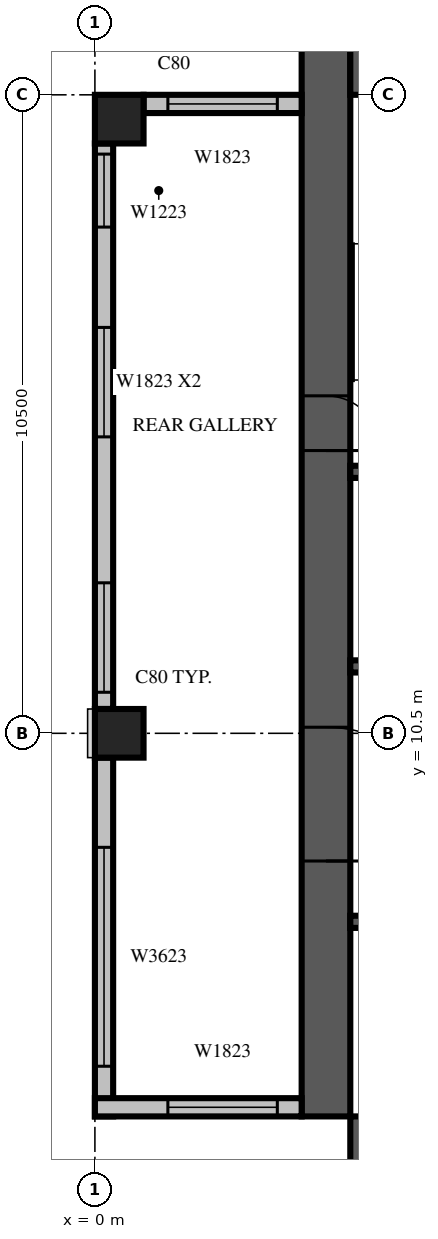
"""IFC4 building model, lengths in metres.
Left out: names, types, materials, properties, quantities, classifications, styles, units other than length and angle.
Written with IfcOpenShell. Run it as: python <this file> out.ifc"""

import sys

from ifc_helpers import new_model, si_unit, direction, frame, frame_2d, origin, origin_2d, place, context, subcontext, project, spatial, rectangle, extrude, source, transform, mapped, element, fill, save


model = new_model("IFC4")
c1 = context("Model", 3, precision=1e-05, world=origin(), true_north=direction((0.0, 1.0)))
c2 = subcontext(c1, "Body", "Model", "MODEL_VIEW")
j1 = project(units=[si_unit("LENGTHUNIT", "METRE"), si_unit("PLANEANGLEUNIT", "RADIAN")], contexts=[c1])
p1 = place(None, origin())
s1 = spatial("IfcSite", under=j1, at=p1, CompositionType="ELEMENT")
p2 = place(p1, origin())
s2 = spatial("IfcBuilding", under=s1, at=p2, CompositionType="ELEMENT")
p3 = place(p2, frame((0.0, 0.0, 227.2)))
s3 = spatial("IfcBuildingStorey", under=s2, at=p3, CompositionType="ELEMENT", Elevation=227.2)
m1 = source(origin(), c2, "Body", "SweptSolid", [
    extrude(rectangle(XDim=0.8, YDim=0.8, at=origin_2d()), origin(), (0.0, 0.0, 1.0), 3.8),
])
for number, where, z_axis, x_axis in (
    (1, (0.4, 10.5, 0.0), (0.0, 0.0, 1.0), (1.0, 0.0, 0.0)),
    (2, (0.4, 20.6, 0.0), (0.0, 0.0, 1.0), (1.0, 0.0, 0.0)),
):
    element("IfcColumn", number, at=place(p3, frame(where, z_axis=z_axis, x_axis=x_axis)), inside=s3, PredefinedType="COLUMN", context=c2, shape_type="MappedRepresentation", body=[
        mapped(m1, transform((0.0, 0.0, 0.0), scale=1.0)),
    ])
m2 = source(origin(), c2, "Body", "SweptSolid", [
    extrude(rectangle(XDim=17.6, YDim=0.8, at=frame_2d((8.8, 0.0))), origin(), (0.0, 0.0, 1.0), 3.8),
])
p4 = place(p3, frame((3.8, 4.2, 0.0), z_axis=(0.0, 0.0, 1.0), x_axis=(0.0, 1.0, 0.0)))
e3 = element("IfcWall", 3, at=p4, inside=s3, PredefinedType="SHEAR", context=c2, shape_type="MappedRepresentation", body=[
    mapped(m2, transform((0.0, 0.0, 0.0), scale=1.0)),
])
m3 = source(origin(), c2, "Body", "SweptSolid", [
    extrude(rectangle(XDim=2.2, YDim=2.1, at=frame_2d((1.1, 1.05))), frame((0.0, 0.41, 0.0), z_axis=(0.0, -1.0, 0.0), x_axis=(1.0, 0.0, 0.0)), (0.0, 0.0, 1.0), 0.82),
])
p5 = place(p4, frame((4.2, 0.0, 0.0)))
e4 = element("IfcOpeningElement", 4, at=p5, cuts=e3, PredefinedType="OPENING", context=c2, shape_type="MappedRepresentation", body=[
    mapped(m3, transform((0.0, 0.0, 0.0), scale=1.0)),
])
m4 = source(origin(), c2, "Body", "SweptSolid", [
    extrude(rectangle(XDim=0.9, YDim=2.1, at=frame_2d((0.45, 1.05))), frame((0.0, 0.41, 0.0), z_axis=(0.0, -1.0, 0.0), x_axis=(1.0, 0.0, 0.0)), (0.0, 0.0, 1.0), 0.82),
])
p6 = place(p4, frame((10.95, 0.0, 0.0)))
e5 = element("IfcOpeningElement", 5, at=p6, cuts=e3, PredefinedType="OPENING", context=c2, shape_type="MappedRepresentation", body=[
    mapped(m4, transform((0.0, 0.0, 0.0), scale=1.0)),
])
p7 = place(p3, frame((4.2, 3.8, 0.0), z_axis=(0.0, 0.0, 1.0), x_axis=(1.0, 0.0, 0.0)))
e6 = element("IfcWall", 6, at=p7, inside=s3, PredefinedType="SHEAR", context=c2, shape_type="MappedRepresentation", body=[
    mapped(m2, transform((0.0, 0.0, 0.0), scale=1.0)),
])
p8 = place(p7, frame((11.55, 0.0, 0.0)))
e7 = element("IfcOpeningElement", 7, at=p8, cuts=e6, PredefinedType="OPENING", context=c2, shape_type="MappedRepresentation", body=[
    mapped(m4, transform((0.0, 0.0, 0.0), scale=1.0)),
])
m5 = source(origin(), c2, "Body", "SweptSolid", [
    extrude(rectangle(XDim=16.8, YDim=0.8, at=frame_2d((8.4, 0.0))), origin(), (0.0, 0.0, 1.0), 3.8),
])
p9 = place(p3, frame((4.2, 21.4, 0.0), z_axis=(0.0, 0.0, 1.0), x_axis=(1.0, 0.0, 0.0)))
e8 = element("IfcWall", 8, at=p9, inside=s3, PredefinedType="SHEAR", context=c2, shape_type="MappedRepresentation", body=[
    mapped(m5, transform((0.0, 0.0, 0.0), scale=1.0)),
])
m6 = source(origin(), c2, "Body", "SweptSolid", [
    extrude(rectangle(XDim=1.2, YDim=2.1, at=frame_2d((0.6, 1.05))), frame((0.0, 0.41, 0.0), z_axis=(0.0, -1.0, 0.0), x_axis=(1.0, 0.0, 0.0)), (0.0, 0.0, 1.0), 0.82),
])
p10 = place(p9, frame((6.2, 0.0, 0.0)))
e9 = element("IfcOpeningElement", 9, at=p10, cuts=e8, PredefinedType="OPENING", context=c2, shape_type="MappedRepresentation", body=[
    mapped(m6, transform((0.0, 0.0, 0.0), scale=1.0)),
])
p11 = place(p3, frame((3.4, 20.85, 0.0), z_axis=(0.0, 0.0, 1.0), x_axis=(-1.0, 0.0, 0.0)))
e10 = element("IfcWall", 10, at=p11, inside=s3, PredefinedType="STANDARD", context=c2, shape_type="SweptSolid", body=[
    extrude(rectangle(XDim=2.6, YDim=0.3, at=frame_2d((1.3, 0.0))), origin(), (0.0, 0.0, 1.0), 3.4),
])
m7 = source(origin(), c2, "Body", "SweptSolid", [
    extrude(rectangle(XDim=1.8, YDim=2.3, at=frame_2d((0.9, 1.15))), frame((0.0, 0.16, 0.0), z_axis=(0.0, -1.0, 0.0), x_axis=(1.0, 0.0, 0.0)), (0.0, 0.0, 1.0), 0.32),
])
p12 = place(p11, frame((0.4, 0.0, 0.6)))
e11 = element("IfcOpeningElement", 11, at=p12, cuts=e10, PredefinedType="OPENING", context=c2, shape_type="MappedRepresentation", body=[
    mapped(m7, transform((0.0, 0.0, 0.0), scale=1.0)),
])
p13 = place(p3, frame((0.15, 20.2, 0.0), z_axis=(0.0, 0.0, 1.0), x_axis=(0.0, -1.0, 0.0)))
e12 = element("IfcWall", 12, at=p13, inside=s3, PredefinedType="STANDARD", context=c2, shape_type="SweptSolid", body=[
    extrude(rectangle(XDim=9.3, YDim=0.3, at=frame_2d((4.65, 0.0))), origin(), (0.0, 0.0, 1.0), 3.4),
])
m8 = source(origin(), c2, "Body", "SweptSolid", [
    extrude(rectangle(XDim=1.2, YDim=2.3, at=frame_2d((0.6, 1.15))), frame((0.0, 0.16, 0.0), z_axis=(0.0, -1.0, 0.0), x_axis=(1.0, 0.0, 0.0)), (0.0, 0.0, 1.0), 0.32),
])
p14 = place(p13, frame((0.175, 0.0, 0.6)))
e13 = element("IfcOpeningElement", 13, at=p14, cuts=e12, PredefinedType="OPENING", context=c2, shape_type="MappedRepresentation", body=[
    mapped(m8, transform((0.0, 0.0, 0.0), scale=1.0)),
])
p15 = place(p13, frame((3.025, 0.0, 0.6)))
e14 = element("IfcOpeningElement", 14, at=p15, cuts=e12, PredefinedType="OPENING", context=c2, shape_type="MappedRepresentation", body=[
    mapped(m7, transform((0.0, 0.0, 0.0), scale=1.0)),
])
p16 = place(p13, frame((7.225, 0.0, 0.6)))
e15 = element("IfcOpeningElement", 15, at=p16, cuts=e12, PredefinedType="OPENING", context=c2, shape_type="MappedRepresentation", body=[
    mapped(m7, transform((0.0, 0.0, 0.0), scale=1.0)),
])
m9 = source(origin(), c2, "Body", "SweptSolid", [
    extrude(rectangle(XDim=5.9, YDim=0.3, at=frame_2d((2.95, 0.0))), origin(), (0.0, 0.0, 1.0), 3.4),
])
p17 = place(p3, frame((0.15, 10.1, 0.0), z_axis=(0.0, 0.0, 1.0), x_axis=(0.0, -1.0, 0.0)))
e16 = element("IfcWall", 16, at=p17, inside=s3, PredefinedType="STANDARD", context=c2, shape_type="MappedRepresentation", body=[
    mapped(m9, transform((0.0, 0.0, 0.0), scale=1.0)),
])
m10 = source(origin(), c2, "Body", "SweptSolid", [
    extrude(rectangle(XDim=3.6, YDim=2.3, at=frame_2d((1.8, 1.15))), frame((0.0, 0.16, 0.0), z_axis=(0.0, -1.0, 0.0), x_axis=(1.0, 0.0, 0.0)), (0.0, 0.0, 1.0), 0.32),
])
p18 = place(p17, frame((1.475, 0.0, 0.6)))
e17 = element("IfcOpeningElement", 17, at=p18, cuts=e16, PredefinedType="OPENING", context=c2, shape_type="MappedRepresentation", body=[
    mapped(m10, transform((0.0, 0.0, 0.0), scale=1.0)),
])
m11 = source(origin(), c2, "Body", "SweptSolid", [
    extrude(rectangle(XDim=3.4, YDim=0.3, at=frame_2d((1.7, 0.0))), origin(), (0.0, 0.0, 1.0), 3.4),
])
p19 = place(p3, frame((0.0, 4.35, 0.0), z_axis=(0.0, 0.0, 1.0), x_axis=(1.0, 0.0, 0.0)))
e18 = element("IfcWall", 18, at=p19, inside=s3, PredefinedType="STANDARD", context=c2, shape_type="MappedRepresentation", body=[
    mapped(m11, transform((0.0, 0.0, 0.0), scale=1.0)),
])
p20 = place(p19, frame((1.2, 0.0, 0.6)))
e19 = element("IfcOpeningElement", 19, at=p20, cuts=e18, PredefinedType="OPENING", context=c2, shape_type="MappedRepresentation", body=[
    mapped(m7, transform((0.0, 0.0, 0.0), scale=1.0)),
])
m12 = source(origin(), c2, "Body", "SweptSolid", [
    extrude(rectangle(XDim=9.6, YDim=0.2, at=frame_2d((4.8, 0.0))), origin(), (0.0, 0.0, 1.0), 3.8),
])
p21 = place(p3, frame((4.2, 7.4, 0.0), z_axis=(0.0, 0.0, 1.0), x_axis=(1.0, 0.0, 0.0)))
e20 = element("IfcWall", 20, at=p21, inside=s3, PredefinedType="SOLIDWALL", context=c2, shape_type="MappedRepresentation", body=[
    mapped(m12, transform((0.0, 0.0, 0.0), scale=1.0)),
])
m13 = source(origin(), c2, "Body", "SweptSolid", [
    extrude(rectangle(XDim=1.1, YDim=2.1, at=frame_2d((0.55, 1.05))), frame((0.0, 0.11, 0.0), z_axis=(0.0, -1.0, 0.0), x_axis=(1.0, 0.0, 0.0)), (0.0, 0.0, 1.0), 0.22),
])
p22 = place(p21, frame((0.65, 0.0, 0.0)))
e21 = element("IfcOpeningElement", 21, at=p22, cuts=e20, PredefinedType="OPENING", context=c2, shape_type="MappedRepresentation", body=[
    mapped(m13, transform((0.0, 0.0, 0.0), scale=1.0)),
])
p23 = place(p21, frame((3.05, 0.0, 0.0)))
e22 = element("IfcOpeningElement", 22, at=p23, cuts=e20, PredefinedType="OPENING", context=c2, shape_type="MappedRepresentation", body=[
    mapped(m13, transform((0.0, 0.0, 0.0), scale=1.0)),
])
p24 = place(p21, frame((5.45, 0.0, 0.0)))
e23 = element("IfcOpeningElement", 23, at=p24, cuts=e20, PredefinedType="OPENING", context=c2, shape_type="MappedRepresentation", body=[
    mapped(m13, transform((0.0, 0.0, 0.0), scale=1.0)),
])
p25 = place(p21, frame((7.85, 0.0, 0.0)))
e24 = element("IfcOpeningElement", 24, at=p25, cuts=e20, PredefinedType="OPENING", context=c2, shape_type="MappedRepresentation", body=[
    mapped(m13, transform((0.0, 0.0, 0.0), scale=1.0)),
])
m14 = source(origin(), c2, "Body", "SweptSolid", [
    extrude(rectangle(XDim=4.8, YDim=0.2, at=frame_2d((2.4, 0.0))), origin(), (0.0, 0.0, 1.0), 3.8),
])
p26 = place(p3, frame((4.2, 11.6, 0.0), z_axis=(0.0, 0.0, 1.0), x_axis=(1.0, 0.0, 0.0)))
e25 = element("IfcWall", 25, at=p26, inside=s3, PredefinedType="SOLIDWALL", context=c2, shape_type="MappedRepresentation", body=[
    mapped(m14, transform((0.0, 0.0, 0.0), scale=1.0)),
])
p27 = place(p26, frame((0.65, 0.0, 0.0)))
e26 = element("IfcOpeningElement", 26, at=p27, cuts=e25, PredefinedType="OPENING", context=c2, shape_type="MappedRepresentation", body=[
    mapped(m13, transform((0.0, 0.0, 0.0), scale=1.0)),
])
p28 = place(p26, frame((3.05, 0.0, 0.0)))
e27 = element("IfcOpeningElement", 27, at=p28, cuts=e25, PredefinedType="OPENING", context=c2, shape_type="MappedRepresentation", body=[
    mapped(m13, transform((0.0, 0.0, 0.0), scale=1.0)),
])
p29 = place(p3, frame((4.2, 14.8, 0.0), z_axis=(0.0, 0.0, 1.0), x_axis=(1.0, 0.0, 0.0)))
e28 = element("IfcWall", 28, at=p29, inside=s3, PredefinedType="SOLIDWALL", context=c2, shape_type="MappedRepresentation", body=[
    mapped(m14, transform((0.0, 0.0, 0.0), scale=1.0)),
])
m15 = source(origin(), c2, "Body", "SweptSolid", [
    extrude(rectangle(XDim=1.8, YDim=2.3, at=frame_2d((0.9, 1.15))), frame((0.0, 0.03, 0.0), z_axis=(0.0, -1.0, 0.0), x_axis=(1.0, 0.0, 0.0)), (0.0, 0.0, 1.0), 0.06),
])
p30 = place(p12, origin())
e29 = element("IfcWindow", 29, at=p30, inside=s3, PartitioningType="SINGLE_PANEL", PredefinedType="WINDOW", context=c2, shape_type="MappedRepresentation", body=[
    mapped(m15, transform((0.0, 0.0, 0.0), scale=1.0)),
])
fill(e11, e29)
m16 = source(origin(), c2, "Body", "SweptSolid", [
    extrude(rectangle(XDim=1.2, YDim=2.3, at=frame_2d((0.6, 1.15))), frame((0.0, 0.03, 0.0), z_axis=(0.0, -1.0, 0.0), x_axis=(1.0, 0.0, 0.0)), (0.0, 0.0, 1.0), 0.06),
])
p31 = place(p14, origin())
e30 = element("IfcWindow", 30, at=p31, inside=s3, PartitioningType="SINGLE_PANEL", PredefinedType="WINDOW", context=c2, shape_type="MappedRepresentation", body=[
    mapped(m16, transform((0.0, 0.0, 0.0), scale=1.0)),
])
fill(e13, e30)
p32 = place(p15, origin())
e31 = element("IfcWindow", 31, at=p32, inside=s3, PartitioningType="SINGLE_PANEL", PredefinedType="WINDOW", context=c2, shape_type="MappedRepresentation", body=[
    mapped(m15, transform((0.0, 0.0, 0.0), scale=1.0)),
])
fill(e14, e31)
p33 = place(p16, origin())
e32 = element("IfcWindow", 32, at=p33, inside=s3, PartitioningType="SINGLE_PANEL", PredefinedType="WINDOW", context=c2, shape_type="MappedRepresentation", body=[
    mapped(m15, transform((0.0, 0.0, 0.0), scale=1.0)),
])
fill(e15, e32)
m17 = source(origin(), c2, "Body", "SweptSolid", [
    extrude(rectangle(XDim=3.6, YDim=2.3, at=frame_2d((1.8, 1.15))), frame((0.0, 0.03, 0.0), z_axis=(0.0, -1.0, 0.0), x_axis=(1.0, 0.0, 0.0)), (0.0, 0.0, 1.0), 0.06),
])
p34 = place(p18, origin())
e33 = element("IfcWindow", 33, at=p34, inside=s3, PartitioningType="SINGLE_PANEL", PredefinedType="WINDOW", context=c2, shape_type="MappedRepresentation", body=[
    mapped(m17, transform((0.0, 0.0, 0.0), scale=1.0)),
])
fill(e17, e33)
p35 = place(p20, origin())
e34 = element("IfcWindow", 34, at=p35, inside=s3, PartitioningType="SINGLE_PANEL", PredefinedType="WINDOW", context=c2, shape_type="MappedRepresentation", body=[
    mapped(m15, transform((0.0, 0.0, 0.0), scale=1.0)),
])
fill(e19, e34)
m18 = source(origin(), c2, "Body", "SweptSolid", [
    extrude(rectangle(XDim=2.2, YDim=2.1, at=frame_2d((1.1, 1.05))), frame((0.0, 0.025, 0.0), z_axis=(0.0, -1.0, 0.0), x_axis=(1.0, 0.0, 0.0)), (0.0, 0.0, 1.0), 0.05),
])
p36 = place(p5, origin())
e35 = element("IfcDoor", 35, at=p36, inside=s3, OperationType="DOUBLE_DOOR_SINGLE_SWING", PredefinedType="DOOR", context=c2, shape_type="MappedRepresentation", body=[
    mapped(m18, transform((0.0, 0.0, 0.0), scale=1.0)),
])
fill(e4, e35)
m19 = source(origin(), c2, "Body", "SweptSolid", [
    extrude(rectangle(XDim=0.9, YDim=2.1, at=frame_2d((0.45, 1.05))), frame((0.0, 0.025, 0.0), z_axis=(0.0, -1.0, 0.0), x_axis=(1.0, 0.0, 0.0)), (0.0, 0.0, 1.0), 0.05),
])
p37 = place(p6, origin())
e36 = element("IfcDoor", 36, at=p37, inside=s3, OperationType="SINGLE_SWING_RIGHT", PredefinedType="DOOR", context=c2, shape_type="MappedRepresentation", body=[
    mapped(m19, transform((0.0, 0.0, 0.0), scale=1.0)),
])
fill(e5, e36)
save(model, sys.argv[1])
